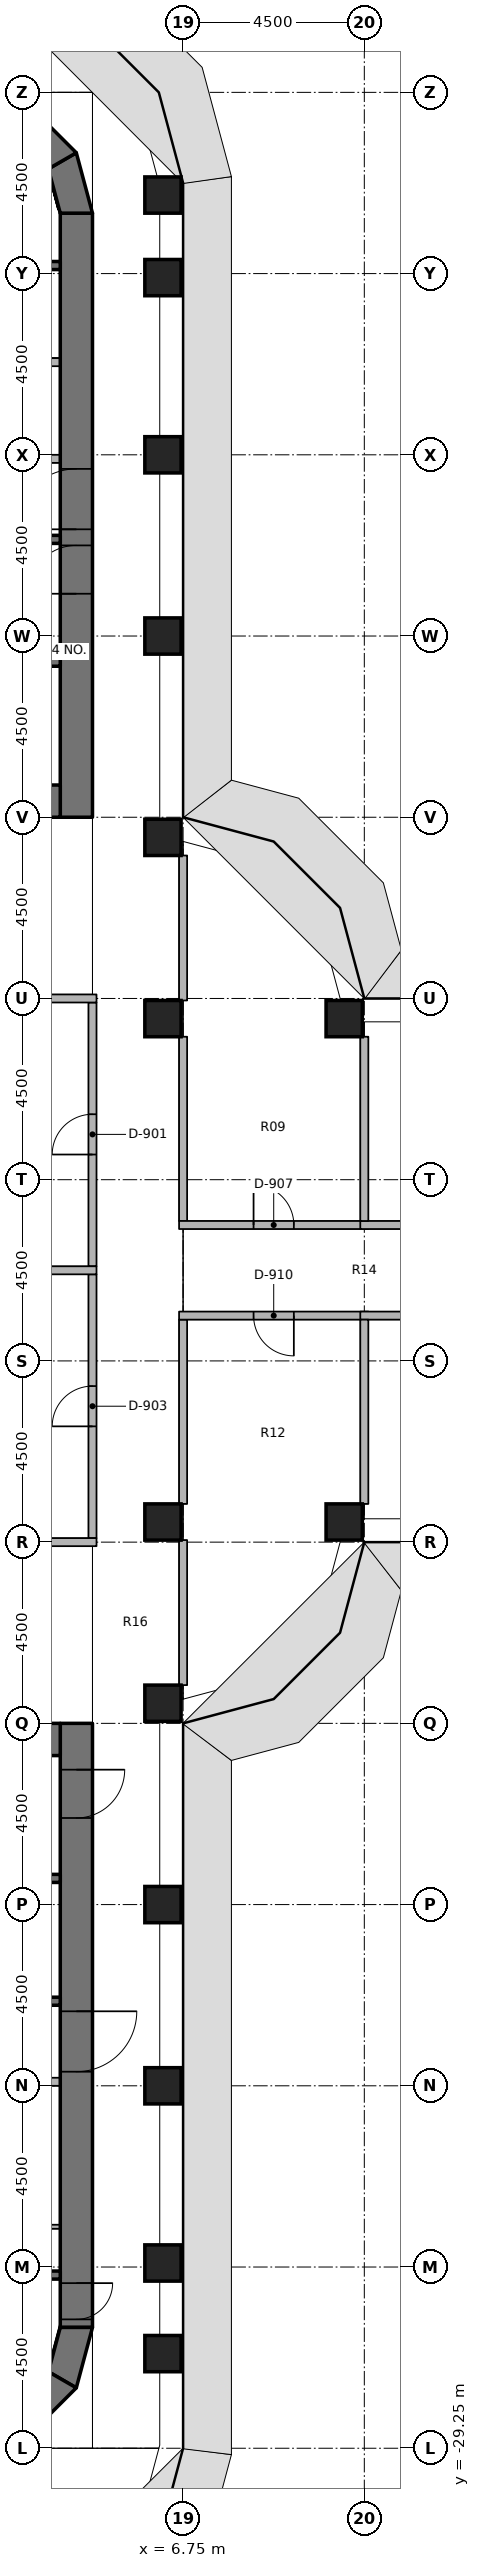
"""IFC4 building model, lengths in metres.
Left out: names, types, materials, properties, quantities, classifications, styles, units other than length and angle.
Written with IfcOpenShell. Run it as: python <this file> out.ifc"""

import sys

from ifc_helpers import new_model, si_unit, direction, frame, frame_2d, origin, origin_2d, place, context, subcontext, project, spatial, polyline, rectangle, outline, extrude, element, fill, save


model = new_model("IFC4")
c1 = context("Model", 3, precision=1e-05, world=origin(), true_north=direction((0.0, 1.0)))
c2 = subcontext(c1, "Body", "Model", "MODEL_VIEW")
j1 = project(units=[si_unit("LENGTHUNIT", "METRE"), si_unit("PLANEANGLEUNIT", "RADIAN")], contexts=[c1])
p1 = place(None, origin())
s1 = spatial("IfcSite", under=j1, at=p1, CompositionType="ELEMENT")
p2 = place(p1, origin())
s2 = spatial("IfcBuilding", under=s1, at=p2, CompositionType="ELEMENT")
p3 = place(p2, frame((0.0, 0.0, 109.4)))
s3 = spatial("IfcBuildingStorey", under=s2, at=p3, CompositionType="ELEMENT", Elevation=109.4)
for number, where, z_axis, x_axis in (
    (1, (6.25, -26.9, 0.0), (0.0, 0.0, 1.0), (1.0, 0.0, 0.0)),
    (2, (6.25, -24.65, 0.0), (0.0, 0.0, 1.0), (1.0, 0.0, 0.0)),
    (3, (6.25, -20.25, 0.0), (0.0, 0.0, 1.0), (1.0, 0.0, 0.0)),
    (4, (6.25, -15.75, 0.0), (0.0, 0.0, 1.0), (1.0, 0.0, 0.0)),
    (5, (6.25, -10.75, 0.0), (0.0, 0.0, 1.0), (1.0, 0.0, 0.0)),
    (6, (6.25, -6.25, 0.0), (0.0, 0.0, 1.0), (1.0, 0.0, 0.0)),
    (7, (6.25, 6.25, 0.0), (0.0, 0.0, 1.0), (1.0, 0.0, 0.0)),
    (8, (6.25, 10.75, 0.0), (0.0, 0.0, 1.0), (1.0, 0.0, 0.0)),
    (9, (6.25, 15.75, 0.0), (0.0, 0.0, 1.0), (1.0, 0.0, 0.0)),
    (10, (6.25, 20.25, 0.0), (0.0, 0.0, 1.0), (1.0, 0.0, 0.0)),
    (11, (6.25, 24.65, 0.0), (0.0, 0.0, 1.0), (1.0, 0.0, 0.0)),
    (12, (6.25, 26.7, 0.0), (0.0, 0.0, 1.0), (1.0, 0.0, 0.0)),
    (13, (10.75, -6.25, 0.0), (0.0, 0.0, 1.0), (1.0, 0.0, 0.0)),
    (14, (10.75, 6.25, 0.0), (0.0, 0.0, 1.0), (1.0, 0.0, 0.0)),
):
    element("IfcColumn", number, at=place(p3, frame(where, z_axis=z_axis, x_axis=x_axis)), inside=s3, PredefinedType="COLUMN", context=c2, shape_type="SweptSolid", body=[
        extrude(rectangle(XDim=0.9, YDim=0.9, at=origin_2d()), origin(), (0.0, 0.0, 1.0), 3.65),
    ])
p4 = place(p3, frame((4.1, 11.25, 0.0), z_axis=(0.0, 0.0, 1.0), x_axis=(0.0, 1.0, 0.0)))
e15 = element("IfcWall", 15, at=p4, inside=s3, PredefinedType="SHEAR", context=c2, shape_type="SweptSolid", body=[
    extrude(rectangle(XDim=15.0, YDim=0.8, at=frame_2d((7.5, 0.0))), origin(), (0.0, 0.0, 1.0), 3.8),
])
p5 = place(p4, frame((7.15, 0.0, 0.0)))
e16 = element("IfcOpeningElement", 16, at=p5, cuts=e15, PredefinedType="OPENING", context=c2, shape_type="SweptSolid", body=[
    extrude(rectangle(XDim=1.5, YDim=2.3, at=frame_2d((0.75, 1.15))), frame((0.0, 0.41, 0.0), z_axis=(0.0, -1.0, 0.0), x_axis=(1.0, 0.0, 0.0)), (0.0, 0.0, 1.0), 0.82),
])
p6 = place(p4, frame((5.55, 0.0, 0.0)))
e17 = element("IfcOpeningElement", 17, at=p6, cuts=e15, PredefinedType="OPENING", context=c2, shape_type="SweptSolid", body=[
    extrude(rectangle(XDim=1.2, YDim=2.1, at=frame_2d((0.6, 1.05))), frame((0.0, 0.41, 0.0), z_axis=(0.0, -1.0, 0.0), x_axis=(1.0, 0.0, 0.0)), (0.0, 0.0, 1.0), 0.82),
])
p7 = place(p3, frame((-3.7, 11.65, 0.0), z_axis=(0.0, 0.0, 1.0), x_axis=(1.0, 0.0, 0.0)))
e18 = element("IfcWall", 18, at=p7, inside=s3, PredefinedType="SHEAR", context=c2, shape_type="SweptSolid", body=[
    extrude(rectangle(XDim=7.4, YDim=0.8, at=frame_2d((3.7, 0.0))), origin(), (0.0, 0.0, 1.0), 3.8),
])
p8 = place(p3, origin())
e19 = element("IfcWall", 19, at=p8, inside=s3, PredefinedType="SHEAR", context=c2, shape_type="SweptSolid", body=[
    extrude(outline(polyline([(4.5, 26.25), (4.098, 27.75), (3.405, 27.35), (3.7, 26.25), (4.5, 26.25)])), origin(), (0.0, 0.0, 1.0), 3.8),
])
p9 = place(p3, origin())
e20 = element("IfcWall", 20, at=p9, inside=s3, PredefinedType="SHEAR", context=c2, shape_type="SweptSolid", body=[
    extrude(outline(polyline([(4.098, 27.75), (3.0, 28.848), (2.6, 28.155), (3.405, 27.35), (4.098, 27.75)])), origin(), (0.0, 0.0, 1.0), 3.8),
])
p10 = place(p3, frame((4.1, -11.25, 0.0), z_axis=(0.0, 0.0, 1.0), x_axis=(0.0, -1.0, 0.0)))
e21 = element("IfcWall", 21, at=p10, inside=s3, PredefinedType="SHEAR", context=c2, shape_type="SweptSolid", body=[
    extrude(rectangle(XDim=15.0, YDim=0.8, at=frame_2d((7.5, 0.0))), origin(), (0.0, 0.0, 1.0), 3.8),
])
p11 = place(p10, frame((7.15, 0.0, 0.0)))
e22 = element("IfcOpeningElement", 22, at=p11, cuts=e21, PredefinedType="OPENING", context=c2, shape_type="SweptSolid", body=[
    extrude(rectangle(XDim=1.5, YDim=2.3, at=frame_2d((0.75, 1.15))), frame((0.0, 0.41, 0.0), z_axis=(0.0, -1.0, 0.0), x_axis=(1.0, 0.0, 0.0)), (0.0, 0.0, 1.0), 0.82),
])
p12 = place(p10, frame((13.9, 0.0, 0.0)))
e23 = element("IfcOpeningElement", 23, at=p12, cuts=e21, PredefinedType="OPENING", context=c2, shape_type="SweptSolid", body=[
    extrude(rectangle(XDim=0.9, YDim=2.1, at=frame_2d((0.45, 1.05))), frame((0.0, 0.41, 0.0), z_axis=(0.0, -1.0, 0.0), x_axis=(1.0, 0.0, 0.0)), (0.0, 0.0, 1.0), 0.82),
])
p13 = place(p10, frame((1.15, 0.0, 0.0)))
e24 = element("IfcOpeningElement", 24, at=p13, cuts=e21, PredefinedType="OPENING", context=c2, shape_type="SweptSolid", body=[
    extrude(rectangle(XDim=1.2, YDim=2.1, at=frame_2d((0.6, 1.05))), frame((0.0, 0.41, 0.0), z_axis=(0.0, -1.0, 0.0), x_axis=(1.0, 0.0, 0.0)), (0.0, 0.0, 1.0), 0.82),
])
p14 = place(p3, frame((-3.7, -11.65, 0.0), z_axis=(0.0, 0.0, 1.0), x_axis=(1.0, 0.0, 0.0)))
e25 = element("IfcWall", 25, at=p14, inside=s3, PredefinedType="SHEAR", context=c2, shape_type="SweptSolid", body=[
    extrude(rectangle(XDim=7.4, YDim=0.8, at=frame_2d((3.7, 0.0))), origin(), (0.0, 0.0, 1.0), 3.8),
])
p15 = place(p3, origin())
e26 = element("IfcWall", 26, at=p15, inside=s3, PredefinedType="SHEAR", context=c2, shape_type="SweptSolid", body=[
    extrude(outline(polyline([(4.5, -26.25), (4.098, -27.75), (3.405, -27.35), (3.7, -26.25), (4.5, -26.25)])), origin(), (0.0, 0.0, 1.0), 3.8),
])
p16 = place(p3, origin())
e27 = element("IfcWall", 27, at=p16, inside=s3, PredefinedType="SHEAR", context=c2, shape_type="SweptSolid", body=[
    extrude(outline(polyline([(4.098, -27.75), (3.0, -28.848), (2.6, -28.155), (3.405, -27.35), (4.098, -27.75)])), origin(), (0.0, 0.0, 1.0), 3.8),
])
for number, where, z_axis, x_axis in (
    (28, (-3.7, 24.95, 0.0), (0.0, 0.0, 1.0), (1.0, 0.0, 0.0)),
    (29, (-3.7, 18.15, 0.0), (0.0, 0.0, 1.0), (1.0, 0.0, 0.0)),
    (30, (-3.7, 15.1, 0.0), (0.0, 0.0, 1.0), (1.0, 0.0, 0.0)),
):
    element("IfcWall", number, at=place(p3, frame(where, z_axis=z_axis, x_axis=x_axis)), inside=s3, PredefinedType="SHEAR", context=c2, shape_type="SweptSolid", body=[
        extrude(rectangle(XDim=7.4, YDim=0.2, at=frame_2d((3.7, 0.0))), origin(), (0.0, 0.0, 1.0), 3.65),
    ])
p17 = place(p3, frame((0.9, 20.15, 0.0), z_axis=(0.0, 0.0, 1.0), x_axis=(1.0, 0.0, 0.0)))
e31 = element("IfcWall", 31, at=p17, inside=s3, PredefinedType="PARTITIONING", context=c2, shape_type="SweptSolid", body=[
    extrude(rectangle(XDim=2.8, YDim=0.2, at=frame_2d((1.4, 0.0))), origin(), (0.0, 0.0, 1.0), 3.65),
])
p18 = place(p3, frame((1.1, 22.55, 0.0), z_axis=(0.0, 0.0, 1.0), x_axis=(1.0, 0.0, 0.0)))
e32 = element("IfcWall", 32, at=p18, inside=s3, PredefinedType="PARTITIONING", context=c2, shape_type="SweptSolid", body=[
    extrude(rectangle(XDim=2.6, YDim=0.2, at=frame_2d((1.3, 0.0))), origin(), (0.0, 0.0, 1.0), 3.65),
])
for number, where, z_axis, x_axis in (
    (33, (3.7, -24.95, 0.0), (0.0, 0.0, 1.0), (-1.0, 0.0, 0.0)),
    (34, (3.7, -18.15, 0.0), (0.0, 0.0, 1.0), (-1.0, 0.0, 0.0)),
    (35, (3.7, -15.1, 0.0), (0.0, 0.0, 1.0), (-1.0, 0.0, 0.0)),
):
    element("IfcWall", number, at=place(p3, frame(where, z_axis=z_axis, x_axis=x_axis)), inside=s3, PredefinedType="SHEAR", context=c2, shape_type="SweptSolid", body=[
        extrude(rectangle(XDim=7.4, YDim=0.2, at=frame_2d((3.7, 0.0))), origin(), (0.0, 0.0, 1.0), 3.65),
    ])
p19 = place(p3, frame((3.7, -20.15, 0.0), z_axis=(0.0, 0.0, 1.0), x_axis=(-1.0, 0.0, 0.0)))
e36 = element("IfcWall", 36, at=p19, inside=s3, PredefinedType="PARTITIONING", context=c2, shape_type="SweptSolid", body=[
    extrude(rectangle(XDim=2.8, YDim=0.2, at=frame_2d((1.4, 0.0))), origin(), (0.0, 0.0, 1.0), 3.65),
])
p20 = place(p3, frame((3.7, -23.75, 0.0), z_axis=(0.0, 0.0, 1.0), x_axis=(-1.0, 0.0, 0.0)))
e37 = element("IfcWall", 37, at=p20, inside=s3, PredefinedType="PARTITIONING", context=c2, shape_type="SweptSolid", body=[
    extrude(rectangle(XDim=2.6, YDim=0.1, at=frame_2d((1.3, 0.0))), origin(), (0.0, 0.0, 1.0), 3.65),
])
p21 = place(p3, frame((4.5, 0.1, 0.0), z_axis=(0.0, 0.0, 1.0), x_axis=(0.0, 1.0, 0.0)))
e38 = element("IfcWall", 38, at=p21, inside=s3, PredefinedType="PARTITIONING", context=c2, shape_type="SweptSolid", body=[
    extrude(rectangle(XDim=6.55, YDim=0.2, at=frame_2d((3.275, 0.0))), origin(), (0.0, 0.0, 1.0), 2.738),
])
p22 = place(p21, frame((2.775, 0.0, 0.0)))
e39 = element("IfcOpeningElement", 39, at=p22, cuts=e38, PredefinedType="OPENING", context=c2, shape_type="SweptSolid", body=[
    extrude(rectangle(XDim=1.0, YDim=2.1, at=frame_2d((0.5, 1.05))), frame((0.0, 0.11, 0.0), z_axis=(0.0, -1.0, 0.0), x_axis=(1.0, 0.0, 0.0)), (0.0, 0.0, 1.0), 0.22),
])
p23 = place(p3, frame((4.5, -6.65, 0.0), z_axis=(0.0, 0.0, 1.0), x_axis=(0.0, 1.0, 0.0)))
e40 = element("IfcWall", 40, at=p23, inside=s3, PredefinedType="PARTITIONING", context=c2, shape_type="SweptSolid", body=[
    extrude(rectangle(XDim=6.55, YDim=0.2, at=frame_2d((3.275, 0.0))), origin(), (0.0, 0.0, 1.0), 2.738),
])
p24 = place(p23, frame((2.775, 0.0, 0.0)))
e41 = element("IfcOpeningElement", 41, at=p24, cuts=e40, PredefinedType="OPENING", context=c2, shape_type="SweptSolid", body=[
    extrude(rectangle(XDim=1.0, YDim=2.1, at=frame_2d((0.5, 1.05))), frame((0.0, 0.11, 0.0), z_axis=(0.0, -1.0, 0.0), x_axis=(1.0, 0.0, 0.0)), (0.0, 0.0, 1.0), 0.22),
])
p25 = place(p3, frame((6.75, 1.225, 0.0), z_axis=(0.0, 0.0, 1.0), x_axis=(0.0, 1.0, 0.0)))
e42 = element("IfcWall", 42, at=p25, inside=s3, PredefinedType="PARTITIONING", context=c2, shape_type="SweptSolid", body=[
    extrude(rectangle(XDim=4.575, YDim=0.2, at=frame_2d((2.288, 0.0))), origin(), (0.0, 0.0, 1.0), 2.738),
])
for number, where, z_axis, x_axis in (
    (43, (6.75, 6.7, 0.0), (0.0, 0.0, 1.0), (0.0, 1.0, 0.0)),
    (44, (6.75, -10.3, 0.0), (0.0, 0.0, 1.0), (0.0, 1.0, 0.0)),
):
    element("IfcWall", number, at=place(p3, frame(where, z_axis=z_axis, x_axis=x_axis)), inside=s3, PredefinedType="PARTITIONING", context=c2, shape_type="SweptSolid", body=[
        extrude(rectangle(XDim=3.6, YDim=0.2, at=frame_2d((1.8, 0.0))), origin(), (0.0, 0.0, 1.0), 2.738),
    ])
p26 = place(p3, frame((6.75, -5.8, 0.0), z_axis=(0.0, 0.0, 1.0), x_axis=(0.0, 1.0, 0.0)))
e45 = element("IfcWall", 45, at=p26, inside=s3, PredefinedType="PARTITIONING", context=c2, shape_type="SweptSolid", body=[
    extrude(rectangle(XDim=4.575, YDim=0.2, at=frame_2d((2.288, 0.0))), origin(), (0.0, 0.0, 1.0), 2.738),
])
for number, where, z_axis, x_axis in (
    (46, (-0.1, 6.75, 0.0), (0.0, 0.0, 1.0), (1.0, 0.0, 0.0)),
    (47, (-0.1, -6.75, 0.0), (0.0, 0.0, 1.0), (1.0, 0.0, 0.0)),
    (48, (-0.1, 0.0, 0.0), (0.0, 0.0, 1.0), (1.0, 0.0, 0.0)),
):
    element("IfcWall", number, at=place(p3, frame(where, z_axis=z_axis, x_axis=x_axis)), inside=s3, PredefinedType="PARTITIONING", context=c2, shape_type="SweptSolid", body=[
        extrude(rectangle(XDim=4.7, YDim=0.2, at=frame_2d((2.35, 0.0))), origin(), (0.0, 0.0, 1.0), 2.738),
    ])
p27 = place(p3, frame((6.65, 1.125, 0.0), z_axis=(0.0, 0.0, 1.0), x_axis=(1.0, 0.0, 0.0)))
e49 = element("IfcWall", 49, at=p27, inside=s3, PredefinedType="PARTITIONING", context=c2, shape_type="SweptSolid", body=[
    extrude(rectangle(XDim=4.7, YDim=0.2, at=frame_2d((2.35, 0.0))), origin(), (0.0, 0.0, 1.0), 2.738),
])
p28 = place(p27, frame((1.85, 0.0, 0.0)))
e50 = element("IfcOpeningElement", 50, at=p28, cuts=e49, PredefinedType="OPENING", context=c2, shape_type="SweptSolid", body=[
    extrude(rectangle(XDim=1.0, YDim=2.1, at=frame_2d((0.5, 1.05))), frame((0.0, 0.11, 0.0), z_axis=(0.0, -1.0, 0.0), x_axis=(1.0, 0.0, 0.0)), (0.0, 0.0, 1.0), 0.22),
])
p29 = place(p3, frame((11.35, -1.125, 0.0), z_axis=(0.0, 0.0, 1.0), x_axis=(-1.0, 0.0, 0.0)))
e51 = element("IfcWall", 51, at=p29, inside=s3, PredefinedType="PARTITIONING", context=c2, shape_type="SweptSolid", body=[
    extrude(rectangle(XDim=4.7, YDim=0.2, at=frame_2d((2.35, 0.0))), origin(), (0.0, 0.0, 1.0), 2.738),
])
p30 = place(p29, frame((1.85, 0.0, 0.0)))
e52 = element("IfcOpeningElement", 52, at=p30, cuts=e51, PredefinedType="OPENING", context=c2, shape_type="SweptSolid", body=[
    extrude(rectangle(XDim=1.0, YDim=2.1, at=frame_2d((0.5, 1.05))), frame((0.0, 0.11, 0.0), z_axis=(0.0, -1.0, 0.0), x_axis=(1.0, 0.0, 0.0)), (0.0, 0.0, 1.0), 0.22),
])
p31 = place(p3, frame((11.15, 1.125, 0.0), z_axis=(0.0, 0.0, 1.0), x_axis=(1.0, 0.0, 0.0)))
e53 = element("IfcWall", 53, at=p31, inside=s3, PredefinedType="PARTITIONING", context=c2, shape_type="SweptSolid", body=[
    extrude(rectangle(XDim=4.7, YDim=0.2, at=frame_2d((2.35, 0.0))), origin(), (0.0, 0.0, 1.0), 2.738),
])
p32 = place(p31, frame((1.85, 0.0, 0.0)))
e54 = element("IfcOpeningElement", 54, at=p32, cuts=e53, PredefinedType="OPENING", context=c2, shape_type="SweptSolid", body=[
    extrude(rectangle(XDim=1.0, YDim=2.1, at=frame_2d((0.5, 1.05))), frame((0.0, 0.11, 0.0), z_axis=(0.0, -1.0, 0.0), x_axis=(1.0, 0.0, 0.0)), (0.0, 0.0, 1.0), 0.22),
])
p33 = place(p3, frame((15.85, -1.125, 0.0), z_axis=(0.0, 0.0, 1.0), x_axis=(-1.0, 0.0, 0.0)))
e55 = element("IfcWall", 55, at=p33, inside=s3, PredefinedType="PARTITIONING", context=c2, shape_type="SweptSolid", body=[
    extrude(rectangle(XDim=4.7, YDim=0.2, at=frame_2d((2.35, 0.0))), origin(), (0.0, 0.0, 1.0), 2.738),
])
p34 = place(p33, frame((1.85, 0.0, 0.0)))
e56 = element("IfcOpeningElement", 56, at=p34, cuts=e55, PredefinedType="OPENING", context=c2, shape_type="SweptSolid", body=[
    extrude(rectangle(XDim=1.0, YDim=2.1, at=frame_2d((0.5, 1.05))), frame((0.0, 0.11, 0.0), z_axis=(0.0, -1.0, 0.0), x_axis=(1.0, 0.0, 0.0)), (0.0, 0.0, 1.0), 0.22),
])
for number, where, z_axis, x_axis in (
    (57, (11.25, 1.225, 0.0), (0.0, 0.0, 1.0), (0.0, 1.0, 0.0)),
    (58, (11.25, -5.8, 0.0), (0.0, 0.0, 1.0), (0.0, 1.0, 0.0)),
):
    element("IfcWall", number, at=place(p3, frame(where, z_axis=z_axis, x_axis=x_axis)), inside=s3, PredefinedType="PARTITIONING", context=c2, shape_type="SweptSolid", body=[
        extrude(rectangle(XDim=4.575, YDim=0.2, at=frame_2d((2.288, 0.0))), origin(), (0.0, 0.0, 1.0), 2.738),
    ])
p35 = place(p5, origin())
e59 = element("IfcDoor", 59, at=p35, inside=s3, OperationType="DOUBLE_DOOR_SINGLE_SWING", PredefinedType="DOOR", context=c2, shape_type="SweptSolid", body=[
    extrude(rectangle(XDim=1.5, YDim=2.3, at=frame_2d((0.75, 1.15))), frame((0.0, 0.025, 0.0), z_axis=(0.0, -1.0, 0.0), x_axis=(1.0, 0.0, 0.0)), (0.0, 0.0, 1.0), 0.05),
])
fill(e16, e59)
p36 = place(p6, origin())
e60 = element("IfcDoor", 60, at=p36, inside=s3, OperationType="SINGLE_SWING_RIGHT", PredefinedType="DOOR", context=c2, shape_type="SweptSolid", body=[
    extrude(rectangle(XDim=1.2, YDim=2.1, at=frame_2d((0.6, 1.05))), frame((0.0, 0.025, 0.0), z_axis=(0.0, -1.0, 0.0), x_axis=(1.0, 0.0, 0.0)), (0.0, 0.0, 1.0), 0.05),
])
fill(e17, e60)
p37 = place(p11, origin())
e61 = element("IfcDoor", 61, at=p37, inside=s3, OperationType="DOUBLE_DOOR_SINGLE_SWING", PredefinedType="DOOR", context=c2, shape_type="SweptSolid", body=[
    extrude(rectangle(XDim=1.5, YDim=2.3, at=frame_2d((0.75, 1.15))), frame((0.0, 0.025, 0.0), z_axis=(0.0, -1.0, 0.0), x_axis=(1.0, 0.0, 0.0)), (0.0, 0.0, 1.0), 0.05),
])
fill(e22, e61)
p38 = place(p12, origin())
e62 = element("IfcDoor", 62, at=p38, inside=s3, OperationType="SINGLE_SWING_LEFT", PredefinedType="DOOR", context=c2, shape_type="SweptSolid", body=[
    extrude(rectangle(XDim=0.9, YDim=2.1, at=frame_2d((0.45, 1.05))), frame((0.0, 0.025, 0.0), z_axis=(0.0, -1.0, 0.0), x_axis=(1.0, 0.0, 0.0)), (0.0, 0.0, 1.0), 0.05),
])
fill(e23, e62)
p39 = place(p13, origin())
e63 = element("IfcDoor", 63, at=p39, inside=s3, OperationType="SINGLE_SWING_RIGHT", PredefinedType="DOOR", context=c2, shape_type="SweptSolid", body=[
    extrude(rectangle(XDim=1.2, YDim=2.1, at=frame_2d((0.6, 1.05))), frame((0.0, 0.025, 0.0), z_axis=(0.0, -1.0, 0.0), x_axis=(1.0, 0.0, 0.0)), (0.0, 0.0, 1.0), 0.05),
])
fill(e24, e63)
p40 = place(p22, origin())
e64 = element("IfcDoor", 64, at=p40, inside=s3, OperationType="SINGLE_SWING_LEFT", PredefinedType="DOOR", context=c2, shape_type="SweptSolid", body=[
    extrude(rectangle(XDim=1.0, YDim=2.1, at=frame_2d((0.5, 1.05))), frame((0.0, 0.025, 0.0), z_axis=(0.0, -1.0, 0.0), x_axis=(1.0, 0.0, 0.0)), (0.0, 0.0, 1.0), 0.05),
])
fill(e39, e64)
p41 = place(p24, origin())
e65 = element("IfcDoor", 65, at=p41, inside=s3, OperationType="SINGLE_SWING_RIGHT", PredefinedType="DOOR", context=c2, shape_type="SweptSolid", body=[
    extrude(rectangle(XDim=1.0, YDim=2.1, at=frame_2d((0.5, 1.05))), frame((0.0, 0.025, 0.0), z_axis=(0.0, -1.0, 0.0), x_axis=(1.0, 0.0, 0.0)), (0.0, 0.0, 1.0), 0.05),
])
fill(e41, e65)
p42 = place(p28, origin())
e66 = element("IfcDoor", 66, at=p42, inside=s3, OperationType="SINGLE_SWING_RIGHT", PredefinedType="DOOR", context=c2, shape_type="SweptSolid", body=[
    extrude(rectangle(XDim=1.0, YDim=2.1, at=frame_2d((0.5, 1.05))), frame((0.0, 0.025, 0.0), z_axis=(0.0, -1.0, 0.0), x_axis=(1.0, 0.0, 0.0)), (0.0, 0.0, 1.0), 0.05),
])
fill(e50, e66)
p43 = place(p30, origin())
e67 = element("IfcDoor", 67, at=p43, inside=s3, OperationType="SINGLE_SWING_RIGHT", PredefinedType="DOOR", context=c2, shape_type="SweptSolid", body=[
    extrude(rectangle(XDim=1.0, YDim=2.1, at=frame_2d((0.5, 1.05))), frame((0.0, 0.025, 0.0), z_axis=(0.0, -1.0, 0.0), x_axis=(1.0, 0.0, 0.0)), (0.0, 0.0, 1.0), 0.05),
])
fill(e52, e67)
save(model, sys.argv[1])
